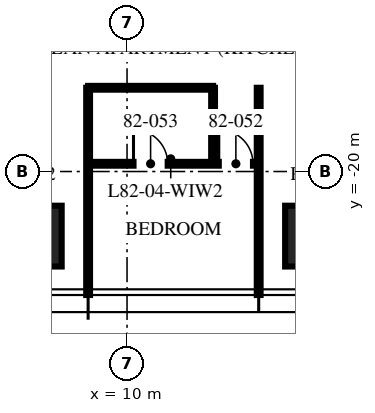
"""IFC4 building model, lengths in metres.
Left out: names, types, materials, properties, quantities, classifications, styles, units other than length and angle.
Written with IfcOpenShell. Run it as: python <this file> out.ifc"""

import sys

from ifc_helpers import new_model, si_unit, direction, frame, frame_2d, origin, origin_2d, place, context, subcontext, project, spatial, rectangle, extrude, element, fill, save


model = new_model("IFC4")
c1 = context("Model", 3, precision=1e-05, world=origin(), true_north=direction((0.0, 1.0)))
c2 = subcontext(c1, "Body", "Model", "MODEL_VIEW")
j1 = project(units=[si_unit("LENGTHUNIT", "METRE"), si_unit("PLANEANGLEUNIT", "RADIAN")], contexts=[c1])
p1 = place(None, origin())
s1 = spatial("IfcSite", under=j1, at=p1, CompositionType="ELEMENT")
p2 = place(p1, origin())
s2 = spatial("IfcBuilding", under=s1, at=p2, CompositionType="ELEMENT")
p3 = place(p2, frame((0.0, 0.0, 327.0)))
s3 = spatial("IfcBuildingStorey", under=s2, at=p3, CompositionType="ELEMENT", Elevation=327.0)
for number, where, z_axis, x_axis in (
    (1, (14.96, -21.7, 0.0), (0.0, 0.0, 1.0), (1.0, 0.0, 0.0)),
    (2, (7.48, -21.7, 0.0), (0.0, 0.0, 1.0), (1.0, 0.0, 0.0)),
):
    element("IfcColumn", number, at=place(p3, frame(where, z_axis=z_axis, x_axis=x_axis)), inside=s3, PredefinedType="COLUMN", context=c2, shape_type="SweptSolid", body=[
        extrude(rectangle(XDim=1.6, YDim=1.6, at=origin_2d()), origin(), (0.0, 0.0, 1.0), 3.75),
    ])
for number, where, z_axis, x_axis in (
    (3, (8.976, -17.796, 0.0), (0.0, 0.0, 1.0), (0.0, -1.0, 0.0)),
    (4, (13.464, -17.796, 0.0), (0.0, 0.0, 1.0), (0.0, -1.0, 0.0)),
):
    element("IfcWall", number, at=place(p3, frame(where, z_axis=z_axis, x_axis=x_axis)), inside=s3, PredefinedType="PARTITIONING", context=c2, shape_type="SweptSolid", body=[
        extrude(rectangle(XDim=5.454, YDim=0.1, at=frame_2d((2.727, 0.0))), origin(), (0.0, 0.0, 1.0), 3.01),
    ])
p4 = place(p3, frame((8.976, -19.796, 0.0), z_axis=(0.0, 0.0, 1.0), x_axis=(1.0, 0.0, 0.0)))
e5 = element("IfcWall", 5, at=p4, inside=s3, PredefinedType="PARTITIONING", context=c2, shape_type="SweptSolid", body=[
    extrude(rectangle(XDim=4.488, YDim=0.1, at=frame_2d((2.244, 0.0))), origin(), (0.0, 0.0, 1.0), 2.91),
])
p5 = place(p4, frame((3.438, 0.0, 0.0)))
e6 = element("IfcOpeningElement", 6, at=p5, cuts=e5, PredefinedType="OPENING", context=c2, shape_type="SweptSolid", body=[
    extrude(rectangle(XDim=0.9, YDim=2.1, at=frame_2d((0.45, 1.05))), frame((0.0, 0.06, 0.0), z_axis=(0.0, -1.0, 0.0), x_axis=(1.0, 0.0, 0.0)), (0.0, 0.0, 1.0), 0.12),
])
p6 = place(p4, frame((1.194, 0.0, 0.0)))
e7 = element("IfcOpeningElement", 7, at=p6, cuts=e5, PredefinedType="OPENING", context=c2, shape_type="SweptSolid", body=[
    extrude(rectangle(XDim=0.9, YDim=2.1, at=frame_2d((0.45, 1.05))), frame((0.0, 0.06, 0.0), z_axis=(0.0, -1.0, 0.0), x_axis=(1.0, 0.0, 0.0)), (0.0, 0.0, 1.0), 0.12),
])
p7 = place(p3, frame((12.264, -17.796, 0.0), z_axis=(0.0, 0.0, 1.0), x_axis=(0.0, -1.0, 0.0)))
e8 = element("IfcWall", 8, at=p7, inside=s3, PredefinedType="PARTITIONING", context=c2, shape_type="SweptSolid", body=[
    extrude(rectangle(XDim=2.0, YDim=0.1, at=frame_2d((1.0, 0.0))), origin(), (0.0, 0.0, 1.0), 3.5),
])
p8 = place(p3, frame((8.976, -17.796, 0.0), z_axis=(0.0, 0.0, 1.0), x_axis=(1.0, 0.0, 0.0)))
e9 = element("IfcWall", 9, at=p8, inside=s3, PredefinedType="PARTITIONING", context=c2, shape_type="SweptSolid", body=[
    extrude(rectangle(XDim=3.288, YDim=0.1, at=frame_2d((1.644, 0.0))), origin(), (0.0, 0.0, 1.0), 2.91),
])
p9 = place(p5, origin())
e10 = element("IfcDoor", 10, at=p9, inside=s3, OperationType="SINGLE_SWING_LEFT", PredefinedType="DOOR", context=c2, shape_type="SweptSolid", body=[
    extrude(rectangle(XDim=0.9, YDim=2.1, at=frame_2d((0.45, 1.05))), frame((0.0, 0.025, 0.0), z_axis=(0.0, -1.0, 0.0), x_axis=(1.0, 0.0, 0.0)), (0.0, 0.0, 1.0), 0.05),
])
fill(e6, e10)
p10 = place(p6, origin())
e11 = element("IfcDoor", 11, at=p10, inside=s3, OperationType="SINGLE_SWING_LEFT", PredefinedType="DOOR", context=c2, shape_type="SweptSolid", body=[
    extrude(rectangle(XDim=0.9, YDim=2.1, at=frame_2d((0.45, 1.05))), frame((0.0, 0.025, 0.0), z_axis=(0.0, -1.0, 0.0), x_axis=(1.0, 0.0, 0.0)), (0.0, 0.0, 1.0), 0.05),
])
fill(e7, e11)
save(model, sys.argv[1])
